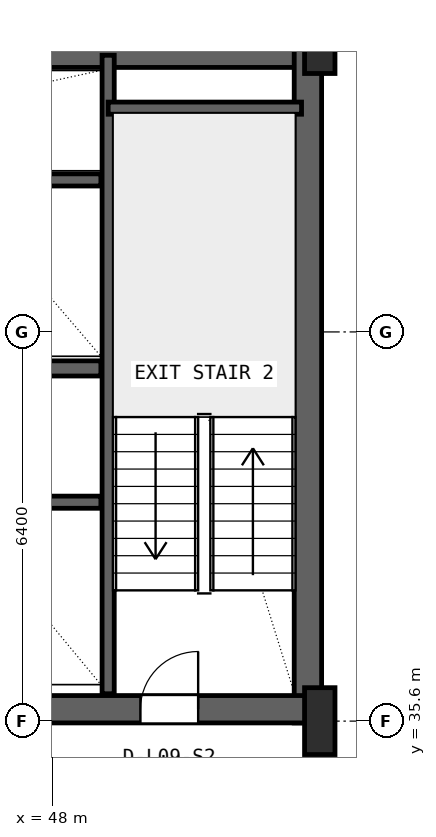
"""IFC4 building model, lengths in metres.
Left out: names, types, materials, properties, quantities, classifications, styles, units other than length and angle.
Written with IfcOpenShell. Run it as: python <this file> out.ifc"""

import sys

from ifc_helpers import new_model, si_unit, direction, frame, frame_2d, origin, origin_2d, place, context, subcontext, project, spatial, rectangle, i_section, extrude, source, transform, mapped, element, fill, save


model = new_model("IFC4")
c1 = context("Model", 3, precision=1e-05, world=origin(), true_north=direction((0.0, 1.0)))
c2 = subcontext(c1, "Body", "Model", "MODEL_VIEW")
j1 = project(units=[si_unit("LENGTHUNIT", "METRE"), si_unit("PLANEANGLEUNIT", "RADIAN")], contexts=[c1])
p1 = place(None, origin())
s1 = spatial("IfcSite", under=j1, at=p1, CompositionType="ELEMENT")
p2 = place(p1, origin())
s2 = spatial("IfcBuilding", under=s1, at=p2, CompositionType="ELEMENT")
p3 = place(p2, frame((0.0, 0.0, 43.2)))
s3 = spatial("IfcBuildingStorey", under=s2, at=p3, CompositionType="ELEMENT", Elevation=43.2)
p4 = place(p3, frame((15.6, 46.575, 0.0), z_axis=(0.0, 0.0, 1.0), x_axis=(1.0, 0.0, 0.0)))
e1 = element("IfcWall", 1, at=p4, inside=s3, PredefinedType="SHEAR", context=c2, shape_type="SweptSolid", body=[
    extrude(rectangle(XDim=36.8, YDim=0.45, at=frame_2d((18.4, 0.0))), origin(), (0.0, 0.0, 1.0), 3.65),
])
p5 = place(p3, frame((52.205, 35.57, 0.0), z_axis=(0.0, 0.0, 1.0), x_axis=(0.0, 1.0, 0.0)))
e2 = element("IfcWall", 2, at=p5, inside=s3, PredefinedType="SHEAR", context=c2, shape_type="SweptSolid", body=[
    extrude(rectangle(XDim=11.23, YDim=0.45, at=frame_2d((5.615, 0.0))), origin(), (0.0, 0.0, 1.0), 3.65),
])
p6 = place(p3, frame((43.2, 35.795, 0.0), z_axis=(0.0, 0.0, 1.0), x_axis=(1.0, 0.0, 0.0)))
e3 = element("IfcWall", 3, at=p6, inside=s3, PredefinedType="SHEAR", context=c2, shape_type="SweptSolid", body=[
    extrude(rectangle(XDim=9.23, YDim=0.45, at=frame_2d((4.615, 0.0))), origin(), (0.0, 0.0, 1.0), 3.65),
])
p7 = place(p6, frame((6.25, 0.0, 0.0)))
e4 = element("IfcOpeningElement", 4, at=p7, cuts=e3, PredefinedType="OPENING", context=c2, shape_type="SweptSolid", body=[
    extrude(rectangle(XDim=0.95, YDim=2.1, at=frame_2d((0.475, 1.05))), frame((0.0, 0.235, 0.0), z_axis=(0.0, -1.0, 0.0), x_axis=(1.0, 0.0, 0.0)), (0.0, 0.0, 1.0), 0.47),
])
m1 = source(origin(), c2, "Body", "SweptSolid", [
    extrude(i_section(OverallWidth=0.5, OverallDepth=1.1, WebThickness=0.018, FlangeThickness=0.032, FilletRadius=0.018, at=origin_2d()), origin(), (0.0, 0.0, 1.0), 3.9),
])
for number, where, z_axis, x_axis in (
    (5, (52.4, 35.6, 0.0), (0.0, 0.0, 1.0), (1.0, 0.0, 0.0)),
    (6, (52.4, 46.8, 0.0), (0.0, 0.0, 1.0), (1.0, 0.0, 0.0)),
):
    element("IfcColumn", number, at=place(p3, frame(where, z_axis=z_axis, x_axis=x_axis)), inside=s3, PredefinedType="COLUMN", context=c2, shape_type="MappedRepresentation", body=[
        mapped(m1, transform((0.0, 0.0, 0.0), x_axis=(1.0, 0.0, 0.0), y_axis=(0.0, 1.0, 0.0), z_axis=(0.0, 0.0, 1.0), scale=1.0)),
    ])
p8 = place(p3, frame((48.92, 36.05, 0.0), z_axis=(0.0, 0.0, 1.0), x_axis=(0.0, 1.0, 0.0)))
e7 = element("IfcWall", 7, at=p8, inside=s3, PredefinedType="SHEAR", context=c2, shape_type="SweptSolid", body=[
    extrude(rectangle(XDim=10.5, YDim=0.2, at=frame_2d((5.25, 0.0))), origin(), (0.0, 0.0, 1.0), 3.65),
])
p9 = place(p3, frame((48.92, 45.68, 0.0), z_axis=(0.0, 0.0, 1.0), x_axis=(1.0, 0.0, 0.0)))
e8 = element("IfcWall", 8, at=p9, inside=s3, PredefinedType="SHEAR", context=c2, shape_type="SweptSolid", body=[
    extrude(rectangle(XDim=3.18, YDim=0.2, at=frame_2d((1.59, 0.0))), origin(), (0.0, 0.0, 1.0), 3.65),
])
p10 = place(p3, frame((24.98, 41.4, 0.0), z_axis=(0.0, 0.0, 1.0), x_axis=(1.0, 0.0, 0.0)))
e9 = element("IfcWall", 9, at=p10, inside=s3, PredefinedType="SHEAR", context=c2, shape_type="SweptSolid", body=[
    extrude(rectangle(XDim=23.82, YDim=0.25, at=frame_2d((11.91, 0.0))), origin(), (0.0, 0.0, 1.0), 3.65),
])
p11 = place(p10, frame((0.87, 0.0, 0.0)))
e10 = element("IfcOpeningElement", 10, at=p11, cuts=e9, PredefinedType="OPENING", context=c2, shape_type="SweptSolid", body=[
    extrude(rectangle(XDim=1.1, YDim=2.18, at=frame_2d((0.55, 1.09))), frame((0.0, 0.135, 0.0), z_axis=(0.0, -1.0, 0.0), x_axis=(1.0, 0.0, 0.0)), (0.0, 0.0, 1.0), 0.27),
])
p12 = place(p10, frame((3.47, 0.0, 0.0)))
e11 = element("IfcOpeningElement", 11, at=p12, cuts=e9, PredefinedType="OPENING", context=c2, shape_type="SweptSolid", body=[
    extrude(rectangle(XDim=1.1, YDim=2.18, at=frame_2d((0.55, 1.09))), frame((0.0, 0.135, 0.0), z_axis=(0.0, -1.0, 0.0), x_axis=(1.0, 0.0, 0.0)), (0.0, 0.0, 1.0), 0.27),
])
p13 = place(p10, frame((6.07, 0.0, 0.0)))
e12 = element("IfcOpeningElement", 12, at=p13, cuts=e9, PredefinedType="OPENING", context=c2, shape_type="SweptSolid", body=[
    extrude(rectangle(XDim=1.1, YDim=2.18, at=frame_2d((0.55, 1.09))), frame((0.0, 0.135, 0.0), z_axis=(0.0, -1.0, 0.0), x_axis=(1.0, 0.0, 0.0)), (0.0, 0.0, 1.0), 0.27),
])
p14 = place(p3, frame((41.22, 44.5, 0.0), z_axis=(0.0, 0.0, 1.0), x_axis=(1.0, 0.0, 0.0)))
e13 = element("IfcWall", 13, at=p14, inside=s3, PredefinedType="SHEAR", context=c2, shape_type="SweptSolid", body=[
    extrude(rectangle(XDim=7.58, YDim=0.2, at=frame_2d((3.79, 0.0))), origin(), (0.0, 0.0, 1.0), 3.65),
])
p15 = place(p3, frame((43.65, 39.2, 0.0), z_axis=(0.0, 0.0, 1.0), x_axis=(1.0, 0.0, 0.0)))
e14 = element("IfcWall", 14, at=p15, inside=s3, PredefinedType="SHEAR", context=c2, shape_type="SweptSolid", body=[
    extrude(rectangle(XDim=5.15, YDim=0.2, at=frame_2d((2.575, 0.0))), origin(), (0.0, 0.0, 1.0), 3.65),
])
m2 = source(origin(), c2, "Body", "SweptSolid", [
    extrude(rectangle(XDim=0.95, YDim=2.1, at=frame_2d((0.475, 1.05))), frame((0.0, 0.025, 0.0), z_axis=(0.0, -1.0, 0.0), x_axis=(1.0, 0.0, 0.0)), (0.0, 0.0, 1.0), 0.05),
])
p16 = place(p7, origin())
e15 = element("IfcDoor", 15, at=p16, inside=s3, OperationType="SINGLE_SWING_RIGHT", PredefinedType="DOOR", context=c2, shape_type="MappedRepresentation", body=[
    mapped(m2, transform((0.0, 0.0, 0.0), x_axis=(1.0, 0.0, 0.0), y_axis=(0.0, 1.0, 0.0), z_axis=(0.0, 0.0, 1.0), scale=1.0)),
])
fill(e4, e15)
save(model, sys.argv[1])
